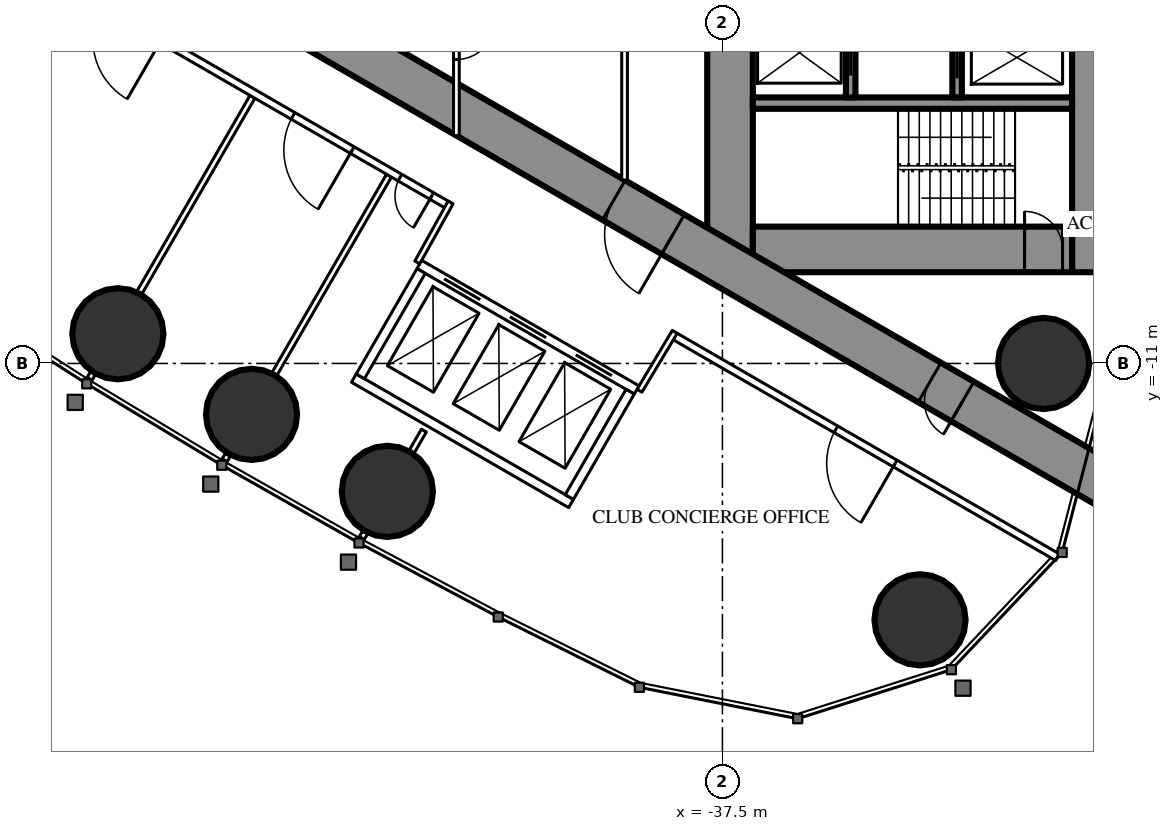
"""IFC4 building model, lengths in metres.
Left out: names, types, materials, properties, quantities, classifications, styles, units other than length and angle.
Written with IfcOpenShell. Run it as: python <this file> out.ifc"""

import sys

from ifc_helpers import new_model, si_unit, direction, frame, frame_2d, origin, origin_2d, place, context, subcontext, project, spatial, rectangle, circle, extrude, element, fill, save


model = new_model("IFC4")
c1 = context("Model", 3, precision=1e-05, world=origin(), true_north=direction((0.0, 1.0)))
c2 = subcontext(c1, "Body", "Model", "MODEL_VIEW")
j1 = project(units=[si_unit("LENGTHUNIT", "METRE"), si_unit("PLANEANGLEUNIT", "RADIAN")], contexts=[c1])
p1 = place(None, origin())
s1 = spatial("IfcSite", under=j1, at=p1, CompositionType="ELEMENT")
p2 = place(p1, origin())
s2 = spatial("IfcBuilding", under=s1, at=p2, CompositionType="ELEMENT")
p3 = place(p2, frame((0.0, 0.0, 247.7)))
s3 = spatial("IfcBuildingStorey", under=s2, at=p3, CompositionType="ELEMENT", Elevation=247.7)
for number, where, z_axis, x_axis in (
    (1, (-32.301, -17.745, 0.0), (0.0, 0.0, 1.0), (1.0, 0.0, 0.0)),
    (2, (-29.05, -11.0, 0.0), (0.0, 0.0, 1.0), (1.0, 0.0, 0.0)),
    (3, (-53.408, -10.219, 0.0), (0.0, 0.0, 1.0), (1.0, 0.0, 0.0)),
    (4, (-49.89, -12.34, 0.0), (0.0, 0.0, 1.0), (1.0, 0.0, 0.0)),
    (5, (-46.317, -14.365, 0.0), (0.0, 0.0, 1.0), (1.0, 0.0, 0.0)),
):
    element("IfcColumn", number, at=place(p3, frame(where, z_axis=z_axis, x_axis=x_axis)), inside=s3, PredefinedType="COLUMN", context=c2, shape_type="SweptSolid", body=[
        extrude(circle(Radius=1.2, at=origin_2d()), origin(), (0.0, 0.0, 1.0), 4.2),
    ])
p4 = place(p3, frame((-27.9, 8.6, 0.0), z_axis=(0.0, 0.0, 1.0), x_axis=(0.0, -1.0, 0.0)))
e6 = element("IfcWall", 6, at=p4, inside=s3, PredefinedType="SHEAR", context=c2, shape_type="SweptSolid", body=[
    extrude(rectangle(XDim=17.2, YDim=0.8, at=frame_2d((8.6, 0.0))), origin(), (0.0, 0.0, 1.0), 4.2),
])
p5 = place(p4, frame((6.95, 0.0, 0.0)))
e7 = element("IfcOpeningElement", 7, at=p5, cuts=e6, PredefinedType="OPENING", context=c2, shape_type="SweptSolid", body=[
    extrude(rectangle(XDim=0.9, YDim=2.2, at=frame_2d((0.45, 1.1))), frame((0.0, 0.41, 0.0), z_axis=(0.0, -1.0, 0.0), x_axis=(1.0, 0.0, 0.0)), (0.0, 0.0, 1.0), 0.82),
])
p6 = place(p3, frame((-37.3, 8.6, 0.0), z_axis=(0.0, 0.0, 1.0), x_axis=(0.0, -1.0, 0.0)))
e8 = element("IfcWall", 8, at=p6, inside=s3, PredefinedType="SHEAR", context=c2, shape_type="SweptSolid", body=[
    extrude(rectangle(XDim=17.2, YDim=1.2, at=frame_2d((8.6, 0.0))), origin(), (0.0, 0.0, 1.0), 4.2),
])
p7 = place(p6, frame((7.7, 0.0, 0.0)))
e9 = element("IfcOpeningElement", 9, at=p7, cuts=e8, PredefinedType="OPENING", context=c2, shape_type="SweptSolid", body=[
    extrude(rectangle(XDim=1.8, YDim=2.2, at=frame_2d((0.9, 1.1))), frame((0.0, 0.61, 0.0), z_axis=(0.0, -1.0, 0.0), x_axis=(1.0, 0.0, 0.0)), (0.0, 0.0, 1.0), 1.22),
])
p8 = place(p3, frame((-28.3, -8.0, 0.0), z_axis=(0.0, 0.0, 1.0), x_axis=(-1.0, 0.0, 0.0)))
e10 = element("IfcWall", 10, at=p8, inside=s3, PredefinedType="SHEAR", context=c2, shape_type="SweptSolid", body=[
    extrude(rectangle(XDim=8.4, YDim=1.2, at=frame_2d((4.2, 0.0))), origin(), (0.0, 0.0, 1.0), 4.2),
])
p9 = place(p8, frame((0.25, 0.0, 0.0)))
e11 = element("IfcOpeningElement", 11, at=p9, cuts=e10, PredefinedType="OPENING", context=c2, shape_type="SweptSolid", body=[
    extrude(rectangle(XDim=1.0, YDim=2.2, at=frame_2d((0.5, 1.1))), frame((0.0, 0.61, 0.0), z_axis=(0.0, -1.0, 0.0), x_axis=(1.0, 0.0, 0.0)), (0.0, 0.0, 1.0), 1.22),
])
p10 = place(p3, frame((-28.3, -4.15, 0.0), z_axis=(0.0, 0.0, 1.0), x_axis=(-1.0, 0.0, 0.0)))
e12 = element("IfcWall", 12, at=p10, inside=s3, PredefinedType="SHEAR", context=c2, shape_type="SweptSolid", body=[
    extrude(rectangle(XDim=8.4, YDim=0.3, at=frame_2d((4.2, 0.0))), origin(), (0.0, 0.0, 1.0), 4.2),
])
p11 = place(p3, frame((-31.325, -1.9, 0.0), z_axis=(0.0, 0.0, 1.0), x_axis=(0.0, -1.0, 0.0)))
e13 = element("IfcWall", 13, at=p11, inside=s3, PredefinedType="SHEAR", context=c2, shape_type="SweptSolid", body=[
    extrude(rectangle(XDim=2.1, YDim=0.25, at=frame_2d((1.05, 0.0))), origin(), (0.0, 0.0, 1.0), 4.2),
])
p12 = place(p11, frame((0.5, 0.0, 0.0)))
e14 = element("IfcOpeningElement", 14, at=p12, cuts=e13, PredefinedType="OPENING", context=c2, shape_type="SweptSolid", body=[
    extrude(rectangle(XDim=1.1, YDim=2.2, at=frame_2d((0.55, 1.1))), frame((0.0, 0.135, 0.0), z_axis=(0.0, -1.0, 0.0), x_axis=(1.0, 0.0, 0.0)), (0.0, 0.0, 1.0), 0.27),
])
p13 = place(p3, frame((-34.125, -1.65, 0.0), z_axis=(0.0, 0.0, 1.0), x_axis=(0.0, -1.0, 0.0)))
e15 = element("IfcWall", 15, at=p13, inside=s3, PredefinedType="SHEAR", context=c2, shape_type="SweptSolid", body=[
    extrude(rectangle(XDim=2.35, YDim=0.25, at=frame_2d((1.175, 0.0))), origin(), (0.0, 0.0, 1.0), 4.2),
])
p14 = place(p13, frame((0.575, 0.0, 0.0)))
e16 = element("IfcOpeningElement", 16, at=p14, cuts=e15, PredefinedType="OPENING", context=c2, shape_type="SweptSolid", body=[
    extrude(rectangle(XDim=1.2, YDim=2.2, at=frame_2d((0.6, 1.1))), frame((0.0, 0.135, 0.0), z_axis=(0.0, -1.0, 0.0), x_axis=(1.0, 0.0, 0.0)), (0.0, 0.0, 1.0), 0.27),
])
p15 = place(p3, frame((-27.2, -14.3, 0.0), z_axis=(0.0, 0.0, 1.0), x_axis=(-0.866024021859, 0.500002393557, 0.0)))
e17 = element("IfcWall", 17, at=p15, inside=s3, PredefinedType="SHEAR", context=c2, shape_type="SweptSolid", body=[
    extrude(rectangle(XDim=27.907, YDim=1.2, at=frame_2d((13.954, 0.0))), origin(), (0.0, 0.0, 1.0), 4.2),
])
p16 = place(p15, frame((4.6, 0.0, 0.0)))
e18 = element("IfcOpeningElement", 18, at=p16, cuts=e17, PredefinedType="OPENING", context=c2, shape_type="SweptSolid", body=[
    extrude(rectangle(XDim=1.0, YDim=2.2, at=frame_2d((0.5, 1.1))), frame((0.0, 0.61, 0.0), z_axis=(0.0, -1.0, 0.0), x_axis=(1.0, 0.0, 0.0)), (0.0, 0.0, 1.0), 1.22),
])
p17 = place(p15, frame((13.395, 0.0, 0.0)))
e19 = element("IfcOpeningElement", 19, at=p17, cuts=e17, PredefinedType="OPENING", context=c2, shape_type="SweptSolid", body=[
    extrude(rectangle(XDim=1.8, YDim=2.2, at=frame_2d((0.9, 1.1))), frame((0.0, 0.61, 0.0), z_axis=(0.0, -1.0, 0.0), x_axis=(1.0, 0.0, 0.0)), (0.0, 0.0, 1.0), 1.22),
])
p18 = place(p3, frame((-46.898, -15.439, 0.0), z_axis=(0.0, 0.0, 1.0), x_axis=(-0.500232303069, -0.865891241997, 0.0)))
e20 = element("IfcWall", 20, at=p18, inside=s3, PredefinedType="PARTITIONING", context=c2, shape_type="SweptSolid", body=[
    extrude(rectangle(XDim=0.18, YDim=0.15, at=frame_2d((0.09, 0.0))), origin(), (0.0, 0.0, 1.0), 3.05),
])
p19 = place(p3, frame((-46.274, -6.059, 0.0), z_axis=(0.0, 0.0, 1.0), x_axis=(-0.500020471368, -0.866013584312, 0.0)))
e21 = element("IfcWall", 21, at=p19, inside=s3, PredefinedType="PARTITIONING", context=c2, shape_type="SweptSolid", body=[
    extrude(rectangle(XDim=6.028, YDim=0.15, at=frame_2d((3.014, 0.0))), origin(), (0.0, 0.0, 1.0), 3.05),
])
p20 = place(p3, frame((-50.508, -13.392, 0.0), z_axis=(0.0, 0.0, 1.0), x_axis=(-0.499644091975, -0.866230789891, 0.0)))
e22 = element("IfcWall", 22, at=p20, inside=s3, PredefinedType="PARTITIONING", context=c2, shape_type="SweptSolid", body=[
    extrude(rectangle(XDim=0.18, YDim=0.15, at=frame_2d((0.09, 0.0))), origin(), (0.0, 0.0, 1.0), 3.05),
])
p21 = place(p3, frame((-49.866, -3.985, 0.0), z_axis=(0.0, 0.0, 1.0), x_axis=(-0.500000694566, -0.866025002776, 0.0)))
e23 = element("IfcWall", 23, at=p21, inside=s3, PredefinedType="PARTITIONING", context=c2, shape_type="SweptSolid", body=[
    extrude(rectangle(XDim=5.95, YDim=0.15, at=frame_2d((2.975, 0.0))), origin(), (0.0, 0.0, 1.0), 3.05),
])
p22 = place(p3, frame((-54.061, -11.25, 0.0), z_axis=(0.0, 0.0, 1.0), x_axis=(-0.500391173478, -0.865799441849, 0.0)))
e24 = element("IfcWall", 24, at=p22, inside=s3, PredefinedType="PARTITIONING", context=c2, shape_type="SweptSolid", body=[
    extrude(rectangle(XDim=0.179, YDim=0.15, at=frame_2d((0.089, 0.0))), origin(), (0.0, 0.0, 1.0), 3.05),
])
p23 = place(p3, frame((-45.356, -12.767, 0.0), z_axis=(0.0, 0.0, 1.0), x_axis=(-0.499886366516, -0.866091000168, 0.0)))
e25 = element("IfcWall", 25, at=p23, inside=s3, PredefinedType="PARTITIONING", context=c2, shape_type="SweptSolid", body=[
    extrude(rectangle(XDim=0.645, YDim=0.15, at=frame_2d((0.322, 0.0))), origin(), (0.0, 0.0, 1.0), 3.95),
])
p24 = place(p3, frame((-28.681, -16.101, 0.0), z_axis=(0.0, 0.0, 1.0), x_axis=(-0.866026079773, 0.499998829152, 0.0)))
e26 = element("IfcWall", 26, at=p24, inside=s3, PredefinedType="PARTITIONING", context=c2, shape_type="SweptSolid", body=[
    extrude(rectangle(XDim=11.674, YDim=0.2, at=frame_2d((5.837, 0.0))), origin(), (0.0, 0.0, 1.0), 3.95),
])
p25 = place(p24, frame((4.937, 0.0, 0.0)))
e27 = element("IfcOpeningElement", 27, at=p25, cuts=e26, PredefinedType="OPENING", context=c2, shape_type="SweptSolid", body=[
    extrude(rectangle(XDim=1.8, YDim=2.2, at=frame_2d((0.9, 1.1))), frame((0.0, 0.11, 0.0), z_axis=(0.0, -1.0, 0.0), x_axis=(1.0, 0.0, 0.0)), (0.0, 0.0, 1.0), 0.22),
])
p26 = place(p3, frame((-44.715, -6.844, 0.0), z_axis=(0.0, 0.0, 1.0), x_axis=(-0.866025261224, 0.500000246922, 0.0)))
e28 = element("IfcWall", 28, at=p26, inside=s3, PredefinedType="PARTITIONING", context=c2, shape_type="SweptSolid", body=[
    extrude(rectangle(XDim=13.567, YDim=0.2, at=frame_2d((6.783, 0.0))), origin(), (0.0, 0.0, 1.0), 3.95),
])
p27 = place(p26, frame((8.716, 0.0, 0.0)))
e29 = element("IfcOpeningElement", 29, at=p27, cuts=e28, PredefinedType="OPENING", context=c2, shape_type="SweptSolid", body=[
    extrude(rectangle(XDim=1.8, YDim=2.2, at=frame_2d((0.9, 1.1))), frame((0.0, 0.11, 0.0), z_axis=(0.0, -1.0, 0.0), x_axis=(1.0, 0.0, 0.0)), (0.0, 0.0, 1.0), 0.22),
])
p28 = place(p26, frame((2.916, 0.0, 0.0)))
e30 = element("IfcOpeningElement", 30, at=p28, cuts=e28, PredefinedType="OPENING", context=c2, shape_type="SweptSolid", body=[
    extrude(rectangle(XDim=1.8, YDim=2.2, at=frame_2d((0.9, 1.1))), frame((0.0, 0.11, 0.0), z_axis=(0.0, -1.0, 0.0), x_axis=(1.0, 0.0, 0.0)), (0.0, 0.0, 1.0), 0.22),
])
p29 = place(p26, frame((0.5, 0.0, 0.0)))
e31 = element("IfcOpeningElement", 31, at=p29, cuts=e28, PredefinedType="OPENING", context=c2, shape_type="SweptSolid", body=[
    extrude(rectangle(XDim=0.967, YDim=2.2, at=frame_2d((0.483, 1.1))), frame((0.0, 0.11, 0.0), z_axis=(0.0, -1.0, 0.0), x_axis=(1.0, 0.0, 0.0)), (0.0, 0.0, 1.0), 0.22),
])
for number, where, z_axis, x_axis in (
    (32, (-44.652, -6.764, 0.0), (0.0, 0.0, 1.0), (-0.486, -0.874, 0.0)),
    (33, (-39.683, -11.718, 0.0), (0.0, 0.0, 1.0), (0.514, 0.858, 0.0)),
):
    element("IfcWall", number, at=place(p3, frame(where, z_axis=z_axis, x_axis=x_axis)), inside=s3, PredefinedType="PARTITIONING", context=c2, shape_type="SweptSolid", body=[
        extrude(rectangle(XDim=1.805, YDim=0.15, at=frame_2d((0.903, 0.0))), origin(), (0.0, 0.0, 1.0), 3.95),
    ])
p30 = place(p3, frame((-40.075, 6.174, 0.0), z_axis=(0.0, 0.0, 1.0), x_axis=(0.0, -1.0, 0.0)))
e34 = element("IfcWall", 34, at=p30, inside=s3, PredefinedType="PARTITIONING", context=c2, shape_type="SweptSolid", body=[
    extrude(rectangle(XDim=12.348, YDim=0.15, at=frame_2d((6.174, 0.0))), origin(), (0.0, 0.0, 1.0), 3.95),
])
p31 = place(p30, frame((5.274, 0.0, 0.0)))
e35 = element("IfcOpeningElement", 35, at=p31, cuts=e34, PredefinedType="OPENING", context=c2, shape_type="SweptSolid", body=[
    extrude(rectangle(XDim=1.8, YDim=2.2, at=frame_2d((0.9, 1.1))), frame((0.0, 0.085, 0.0), z_axis=(0.0, -1.0, 0.0), x_axis=(1.0, 0.0, 0.0)), (0.0, 0.0, 1.0), 0.17),
])
p32 = place(p3, frame((-44.5, 5.005, 0.0), z_axis=(0.0, 0.0, 1.0), x_axis=(0.0, -1.0, 0.0)))
e36 = element("IfcWall", 36, at=p32, inside=s3, PredefinedType="PARTITIONING", context=c2, shape_type="SweptSolid", body=[
    extrude(rectangle(XDim=10.009, YDim=0.15, at=frame_2d((5.005, 0.0))), origin(), (0.0, 0.0, 1.0), 3.1),
])
p33 = place(p32, frame((2.002, 0.0, 0.0)))
e37 = element("IfcOpeningElement", 37, at=p33, cuts=e36, PredefinedType="OPENING", context=c2, shape_type="SweptSolid", body=[
    extrude(rectangle(XDim=1.0, YDim=2.2, at=frame_2d((0.5, 1.1))), frame((0.0, 0.085, 0.0), z_axis=(0.0, -1.0, 0.0), x_axis=(1.0, 0.0, 0.0)), (0.0, 0.0, 1.0), 0.17),
])
p34 = place(p32, frame((7.007, 0.0, 0.0)))
e38 = element("IfcOpeningElement", 38, at=p34, cuts=e36, PredefinedType="OPENING", context=c2, shape_type="SweptSolid", body=[
    extrude(rectangle(XDim=1.0, YDim=2.2, at=frame_2d((0.5, 1.1))), frame((0.0, 0.085, 0.0), z_axis=(0.0, -1.0, 0.0), x_axis=(1.0, 0.0, 0.0)), (0.0, 0.0, 1.0), 0.17),
])
p35 = place(p3, frame((-39.758, -11.697, 0.0), z_axis=(0.0, 0.0, 1.0), x_axis=(-0.866024194504, 0.500002094529, 0.0)))
e39 = element("IfcWall", 39, at=p35, inside=s3, PredefinedType="PARTITIONING", context=c2, shape_type="SweptSolid", body=[
    extrude(rectangle(XDim=6.6, YDim=0.25, at=frame_2d((3.3, 0.0))), origin(), (0.0, 0.0, 1.0), 3.95),
])
p36 = place(p35, frame((0.75, 0.0, 0.0)))
e40 = element("IfcOpeningElement", 40, at=p36, cuts=e39, PredefinedType="OPENING", context=c2, shape_type="SweptSolid", body=[
    extrude(rectangle(XDim=1.1, YDim=2.2, at=frame_2d((0.55, 1.1))), frame((0.0, 0.135, 0.0), z_axis=(0.0, -1.0, 0.0), x_axis=(1.0, 0.0, 0.0)), (0.0, 0.0, 1.0), 0.27),
])
p37 = place(p35, frame((2.75, 0.0, 0.0)))
e41 = element("IfcOpeningElement", 41, at=p37, cuts=e39, PredefinedType="OPENING", context=c2, shape_type="SweptSolid", body=[
    extrude(rectangle(XDim=1.1, YDim=2.2, at=frame_2d((0.55, 1.1))), frame((0.0, 0.135, 0.0), z_axis=(0.0, -1.0, 0.0), x_axis=(1.0, 0.0, 0.0)), (0.0, 0.0, 1.0), 0.27),
])
p38 = place(p35, frame((4.75, 0.0, 0.0)))
e42 = element("IfcOpeningElement", 42, at=p38, cuts=e39, PredefinedType="OPENING", context=c2, shape_type="SweptSolid", body=[
    extrude(rectangle(XDim=1.1, YDim=2.2, at=frame_2d((0.55, 1.1))), frame((0.0, 0.135, 0.0), z_axis=(0.0, -1.0, 0.0), x_axis=(1.0, 0.0, 0.0)), (0.0, 0.0, 1.0), 0.27),
])
p39 = place(p3, frame((-41.482, -14.686, 0.0), z_axis=(0.0, 0.0, 1.0), x_axis=(-0.86603344179, 0.499986077507, 0.0)))
e43 = element("IfcWall", 43, at=p39, inside=s3, PredefinedType="PARTITIONING", context=c2, shape_type="SweptSolid", body=[
    extrude(rectangle(XDim=6.6, YDim=0.25, at=frame_2d((3.3, 0.0))), origin(), (0.0, 0.0, 1.0), 3.95),
])
for number, where, z_axis, x_axis in (
    (44, (-39.928, -11.743, 0.0), (0.0, 0.0, 1.0), (-0.5, -0.866, 0.0)),
    (45, (-45.428, -8.568, 0.0), (0.0, 0.0, 1.0), (-0.5, -0.866, 0.0)),
):
    element("IfcWall", number, at=place(p3, frame(where, z_axis=z_axis, x_axis=x_axis)), inside=s3, PredefinedType="PARTITIONING", context=c2, shape_type="SweptSolid", body=[
        extrude(rectangle(XDim=3.201, YDim=0.25, at=frame_2d((1.6, 0.0))), origin(), (0.0, 0.0, 1.0), 3.95),
    ])
p40 = place(p28, origin())
e46 = element("IfcDoor", 46, at=p40, inside=s3, OperationType="DOUBLE_DOOR_SINGLE_SWING", PredefinedType="DOOR", context=c2, shape_type="SweptSolid", body=[
    extrude(rectangle(XDim=1.8, YDim=2.2, at=frame_2d((0.9, 1.1))), frame((0.0, 0.025, 0.0), z_axis=(0.0, -1.0, 0.0), x_axis=(1.0, 0.0, 0.0)), (0.0, 0.0, 1.0), 0.05),
])
fill(e30, e46)
p41 = place(p29, origin())
e47 = element("IfcDoor", 47, at=p41, inside=s3, OperationType="SINGLE_SWING_LEFT", PredefinedType="DOOR", context=c2, shape_type="SweptSolid", body=[
    extrude(rectangle(XDim=0.967, YDim=2.2, at=frame_2d((0.483, 1.1))), frame((0.0, 0.025, 0.0), z_axis=(0.0, -1.0, 0.0), x_axis=(1.0, 0.0, 0.0)), (0.0, 0.0, 1.0), 0.05),
])
fill(e31, e47)
p42 = place(p25, origin())
e48 = element("IfcDoor", 48, at=p42, inside=s3, OperationType="DOUBLE_DOOR_SINGLE_SWING", PredefinedType="DOOR", context=c2, shape_type="SweptSolid", body=[
    extrude(rectangle(XDim=1.8, YDim=2.2, at=frame_2d((0.9, 1.1))), frame((0.0, 0.025, 0.0), z_axis=(0.0, -1.0, 0.0), x_axis=(1.0, 0.0, 0.0)), (0.0, 0.0, 1.0), 0.05),
])
fill(e27, e48)
p43 = place(p34, origin())
e49 = element("IfcDoor", 49, at=p43, inside=s3, OperationType="SINGLE_SWING_LEFT", PredefinedType="DOOR", context=c2, shape_type="SweptSolid", body=[
    extrude(rectangle(XDim=1.0, YDim=2.2, at=frame_2d((0.5, 1.1))), frame((0.0, 0.025, 0.0), z_axis=(0.0, -1.0, 0.0), x_axis=(1.0, 0.0, 0.0)), (0.0, 0.0, 1.0), 0.05),
])
fill(e38, e49)
p44 = place(p16, origin())
e50 = element("IfcDoor", 50, at=p44, inside=s3, OperationType="SINGLE_SWING_LEFT", PredefinedType="DOOR", context=c2, shape_type="SweptSolid", body=[
    extrude(rectangle(XDim=1.0, YDim=2.2, at=frame_2d((0.5, 1.1))), frame((0.0, 0.025, 0.0), z_axis=(0.0, -1.0, 0.0), x_axis=(1.0, 0.0, 0.0)), (0.0, 0.0, 1.0), 0.05),
])
fill(e18, e50)
p45 = place(p17, origin())
e51 = element("IfcDoor", 51, at=p45, inside=s3, OperationType="DOUBLE_DOOR_SINGLE_SWING", PredefinedType="DOOR", context=c2, shape_type="SweptSolid", body=[
    extrude(rectangle(XDim=1.8, YDim=2.2, at=frame_2d((0.9, 1.1))), frame((0.0, 0.025, 0.0), z_axis=(0.0, -1.0, 0.0), x_axis=(1.0, 0.0, 0.0)), (0.0, 0.0, 1.0), 0.05),
])
fill(e19, e51)
p46 = place(p9, origin())
e52 = element("IfcDoor", 52, at=p46, inside=s3, OperationType="SINGLE_SWING_RIGHT", PredefinedType="DOOR", context=c2, shape_type="SweptSolid", body=[
    extrude(rectangle(XDim=1.0, YDim=2.2, at=frame_2d((0.5, 1.1))), frame((0.0, 0.025, 0.0), z_axis=(0.0, -1.0, 0.0), x_axis=(1.0, 0.0, 0.0)), (0.0, 0.0, 1.0), 0.05),
])
fill(e11, e52)
p47 = place(p12, origin())
e53 = element("IfcDoor", 53, at=p47, inside=s3, OperationType="SLIDING_TO_LEFT", PredefinedType="USERDEFINED", context=c2, shape_type="SweptSolid", body=[
    extrude(rectangle(XDim=1.1, YDim=2.2, at=frame_2d((0.55, 1.1))), frame((0.0, 0.025, 0.0), z_axis=(0.0, -1.0, 0.0), x_axis=(1.0, 0.0, 0.0)), (0.0, 0.0, 1.0), 0.05),
])
fill(e14, e53)
p48 = place(p14, origin())
e54 = element("IfcDoor", 54, at=p48, inside=s3, OperationType="DOUBLE_DOOR_SLIDING", PredefinedType="USERDEFINED", context=c2, shape_type="SweptSolid", body=[
    extrude(rectangle(XDim=1.2, YDim=2.2, at=frame_2d((0.6, 1.1))), frame((0.0, 0.025, 0.0), z_axis=(0.0, -1.0, 0.0), x_axis=(1.0, 0.0, 0.0)), (0.0, 0.0, 1.0), 0.05),
])
fill(e16, e54)
p49 = place(p36, origin())
e55 = element("IfcDoor", 55, at=p49, inside=s3, OperationType="DOUBLE_DOOR_SLIDING", PredefinedType="USERDEFINED", context=c2, shape_type="SweptSolid", body=[
    extrude(rectangle(XDim=1.1, YDim=2.2, at=frame_2d((0.55, 1.1))), frame((0.0, 0.025, 0.0), z_axis=(0.0, -1.0, 0.0), x_axis=(1.0, 0.0, 0.0)), (0.0, 0.0, 1.0), 0.05),
])
fill(e40, e55)
p50 = place(p37, origin())
e56 = element("IfcDoor", 56, at=p50, inside=s3, OperationType="DOUBLE_DOOR_SLIDING", PredefinedType="USERDEFINED", context=c2, shape_type="SweptSolid", body=[
    extrude(rectangle(XDim=1.1, YDim=2.2, at=frame_2d((0.55, 1.1))), frame((0.0, 0.025, 0.0), z_axis=(0.0, -1.0, 0.0), x_axis=(1.0, 0.0, 0.0)), (0.0, 0.0, 1.0), 0.05),
])
fill(e41, e56)
p51 = place(p38, origin())
e57 = element("IfcDoor", 57, at=p51, inside=s3, OperationType="DOUBLE_DOOR_SLIDING", PredefinedType="USERDEFINED", context=c2, shape_type="SweptSolid", body=[
    extrude(rectangle(XDim=1.1, YDim=2.2, at=frame_2d((0.55, 1.1))), frame((0.0, 0.025, 0.0), z_axis=(0.0, -1.0, 0.0), x_axis=(1.0, 0.0, 0.0)), (0.0, 0.0, 1.0), 0.05),
])
fill(e42, e57)
save(model, sys.argv[1])
